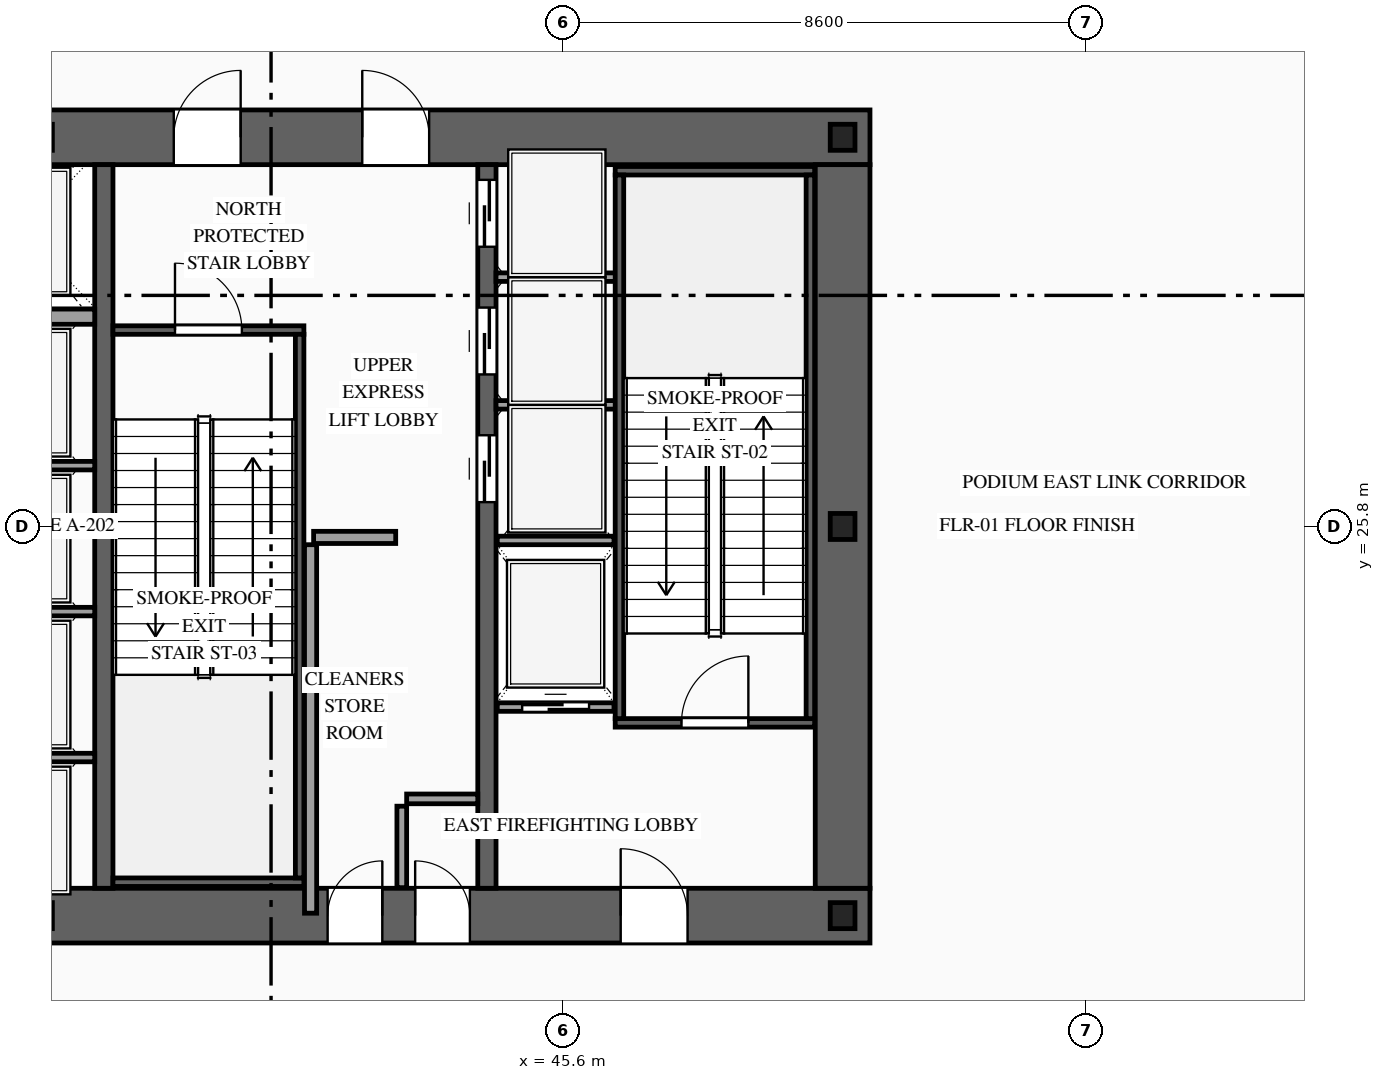
"""IFC4 building model, lengths in metres.
Left out: names, types, materials, properties, quantities, classifications, styles, units other than length and angle.
Written with IfcOpenShell. Run it as: python <this file> out.ifc"""

import sys

from ifc_helpers import new_model, si_unit, direction, frame, frame_2d, origin, origin_2d, place, context, subcontext, project, spatial, rectangle, i_section, extrude, source, transform, mapped, element, fill, save


model = new_model("IFC4")
c1 = context("Model", 3, precision=1e-05, world=origin(), true_north=direction((0.0, 1.0)))
c2 = subcontext(c1, "Body", "Model", "MODEL_VIEW")
j1 = project(units=[si_unit("LENGTHUNIT", "METRE"), si_unit("PLANEANGLEUNIT", "RADIAN")], contexts=[c1])
p1 = place(None, origin())
s1 = spatial("IfcSite", under=j1, at=p1, CompositionType="ELEMENT")
p2 = place(p1, origin())
s2 = spatial("IfcBuilding", under=s1, at=p2, CompositionType="ELEMENT")
p3 = place(p2, origin())
s3 = spatial("IfcBuildingStorey", under=s2, at=p3, CompositionType="ELEMENT", Elevation=0.0)
p4 = place(p3, frame((23.35, 19.4, 0.0), z_axis=(0.0, 0.0, 1.0), x_axis=(1.0, 0.0, 0.0)))
e1 = element("IfcWall", 1, at=p4, inside=s3, PredefinedType="SHEAR", context=c2, shape_type="SweptSolid", body=[
    extrude(rectangle(XDim=27.3, YDim=0.9, at=frame_2d((13.65, 0.0))), origin(), (0.0, 0.0, 1.0), 5.4),
])
p5 = place(p4, frame((2.1, 0.0, 0.0)))
e2 = element("IfcOpeningElement", 2, at=p5, cuts=e1, PredefinedType="OPENING", context=c2, shape_type="SweptSolid", body=[
    extrude(rectangle(XDim=1.1, YDim=2.2, at=frame_2d((0.55, 1.1))), frame((0.0, 0.465, 0.0), z_axis=(0.0, -1.0, 0.0), x_axis=(1.0, 0.0, 0.0)), (0.0, 0.0, 1.0), 0.93),
])
p6 = place(p4, frame((10.0, 0.0, 0.0)))
e3 = element("IfcOpeningElement", 3, at=p6, cuts=e1, PredefinedType="OPENING", context=c2, shape_type="SweptSolid", body=[
    extrude(rectangle(XDim=1.1, YDim=2.2, at=frame_2d((0.55, 1.1))), frame((0.0, 0.465, 0.0), z_axis=(0.0, -1.0, 0.0), x_axis=(1.0, 0.0, 0.0)), (0.0, 0.0, 1.0), 0.93),
])
p7 = place(p4, frame((23.2, 0.0, 0.0)))
e4 = element("IfcOpeningElement", 4, at=p7, cuts=e1, PredefinedType="OPENING", context=c2, shape_type="SweptSolid", body=[
    extrude(rectangle(XDim=1.1, YDim=2.2, at=frame_2d((0.55, 1.1))), frame((0.0, 0.465, 0.0), z_axis=(0.0, -1.0, 0.0), x_axis=(1.0, 0.0, 0.0)), (0.0, 0.0, 1.0), 0.93),
])
p8 = place(p4, frame((19.82, 0.0, 0.0)))
e5 = element("IfcOpeningElement", 5, at=p8, cuts=e1, PredefinedType="OPENING", context=c2, shape_type="SweptSolid", body=[
    extrude(rectangle(XDim=0.9, YDim=2.15, at=frame_2d((0.45, 1.075))), frame((0.0, 0.465, 0.0), z_axis=(0.0, -1.0, 0.0), x_axis=(1.0, 0.0, 0.0)), (0.0, 0.0, 1.0), 0.93),
])
p9 = place(p4, frame((18.38, 0.0, 0.0)))
e6 = element("IfcOpeningElement", 6, at=p9, cuts=e1, PredefinedType="OPENING", context=c2, shape_type="SweptSolid", body=[
    extrude(rectangle(XDim=0.9, YDim=2.15, at=frame_2d((0.45, 1.075))), frame((0.0, 0.465, 0.0), z_axis=(0.0, -1.0, 0.0), x_axis=(1.0, 0.0, 0.0)), (0.0, 0.0, 1.0), 0.93),
])
p10 = place(p3, frame((23.35, 32.2, 0.0), z_axis=(0.0, 0.0, 1.0), x_axis=(1.0, 0.0, 0.0)))
e7 = element("IfcWall", 7, at=p10, inside=s3, PredefinedType="SHEAR", context=c2, shape_type="SweptSolid", body=[
    extrude(rectangle(XDim=27.3, YDim=0.9, at=frame_2d((13.65, 0.0))), origin(), (0.0, 0.0, 1.0), 5.4),
])
p11 = place(p10, frame((4.72, 0.0, 0.0)))
e8 = element("IfcOpeningElement", 8, at=p11, cuts=e7, PredefinedType="OPENING", context=c2, shape_type="SweptSolid", body=[
    extrude(rectangle(XDim=0.9, YDim=2.15, at=frame_2d((0.45, 1.075))), frame((0.0, 0.465, 0.0), z_axis=(0.0, -1.0, 0.0), x_axis=(1.0, 0.0, 0.0)), (0.0, 0.0, 1.0), 0.93),
])
p12 = place(p10, frame((10.0, 0.0, 0.0)))
e9 = element("IfcOpeningElement", 9, at=p12, cuts=e7, PredefinedType="OPENING", context=c2, shape_type="SweptSolid", body=[
    extrude(rectangle(XDim=1.1, YDim=2.2, at=frame_2d((0.55, 1.1))), frame((0.0, 0.465, 0.0), z_axis=(0.0, -1.0, 0.0), x_axis=(1.0, 0.0, 0.0)), (0.0, 0.0, 1.0), 0.93),
])
p13 = place(p10, frame((15.85, 0.0, 0.0)))
e10 = element("IfcOpeningElement", 10, at=p13, cuts=e7, PredefinedType="OPENING", context=c2, shape_type="SweptSolid", body=[
    extrude(rectangle(XDim=1.1, YDim=2.2, at=frame_2d((0.55, 1.1))), frame((0.0, 0.465, 0.0), z_axis=(0.0, -1.0, 0.0), x_axis=(1.0, 0.0, 0.0)), (0.0, 0.0, 1.0), 0.93),
])
p14 = place(p10, frame((18.95, 0.0, 0.0)))
e11 = element("IfcOpeningElement", 11, at=p14, cuts=e7, PredefinedType="OPENING", context=c2, shape_type="SweptSolid", body=[
    extrude(rectangle(XDim=1.1, YDim=2.2, at=frame_2d((0.55, 1.1))), frame((0.0, 0.465, 0.0), z_axis=(0.0, -1.0, 0.0), x_axis=(1.0, 0.0, 0.0)), (0.0, 0.0, 1.0), 0.93),
])
m1 = source(origin(), c2, "Body", "SweptSolid", [
    extrude(rectangle(XDim=11.9, YDim=0.9, at=frame_2d((5.95, 0.0))), origin(), (0.0, 0.0, 1.0), 5.4),
])
p15 = place(p3, frame((50.2, 19.85, 0.0), z_axis=(0.0, 0.0, 1.0), x_axis=(0.0, 1.0, 0.0)))
e12 = element("IfcWall", 12, at=p15, inside=s3, PredefinedType="SHEAR", context=c2, shape_type="MappedRepresentation", body=[
    mapped(m1, transform((0.0, 0.0, 0.0), scale=1.0)),
])
m2 = source(origin(), c2, "Body", "SweptSolid", [
    extrude(rectangle(XDim=11.9, YDim=0.3, at=frame_2d((5.95, 0.0))), origin(), (0.0, 0.0, 1.0), 5.4),
])
p16 = place(p3, frame((38.05, 19.85, 0.0), z_axis=(0.0, 0.0, 1.0), x_axis=(0.0, 1.0, 0.0)))
e13 = element("IfcWall", 13, at=p16, inside=s3, PredefinedType="SOLIDWALL", context=c2, shape_type="MappedRepresentation", body=[
    mapped(m2, transform((0.0, 0.0, 0.0), scale=1.0)),
])
p17 = place(p3, frame((44.35, 19.85, 0.0), z_axis=(0.0, 0.0, 1.0), x_axis=(0.0, 1.0, 0.0)))
e14 = element("IfcWall", 14, at=p17, inside=s3, PredefinedType="SOLIDWALL", context=c2, shape_type="SweptSolid", body=[
    extrude(rectangle(XDim=11.9, YDim=0.3, at=frame_2d((5.95, 0.0))), origin(), (0.0, 0.0, 1.0), 5.4),
])
p18 = place(p17, frame((6.35, 0.0, 0.0)))
e15 = element("IfcOpeningElement", 15, at=p18, cuts=e14, PredefinedType="OPENING", context=c2, shape_type="SweptSolid", body=[
    extrude(rectangle(XDim=1.1, YDim=2.2, at=frame_2d((0.55, 1.1))), frame((0.0, 0.165, 0.0), z_axis=(0.0, -1.0, 0.0), x_axis=(1.0, 0.0, 0.0)), (0.0, 0.0, 1.0), 0.33),
])
p19 = place(p17, frame((8.45, 0.0, 0.0)))
e16 = element("IfcOpeningElement", 16, at=p19, cuts=e14, PredefinedType="OPENING", context=c2, shape_type="SweptSolid", body=[
    extrude(rectangle(XDim=1.1, YDim=2.2, at=frame_2d((0.55, 1.1))), frame((0.0, 0.165, 0.0), z_axis=(0.0, -1.0, 0.0), x_axis=(1.0, 0.0, 0.0)), (0.0, 0.0, 1.0), 0.33),
])
p20 = place(p17, frame((10.55, 0.0, 0.0)))
e17 = element("IfcOpeningElement", 17, at=p20, cuts=e14, PredefinedType="OPENING", context=c2, shape_type="SweptSolid", body=[
    extrude(rectangle(XDim=1.1, YDim=2.2, at=frame_2d((0.55, 1.1))), frame((0.0, 0.165, 0.0), z_axis=(0.0, -1.0, 0.0), x_axis=(1.0, 0.0, 0.0)), (0.0, 0.0, 1.0), 0.33),
])
m3 = source(origin(), c2, "Body", "SweptSolid", [
    extrude(i_section(OverallWidth=0.407, OverallDepth=0.428, WebThickness=0.02, FlangeThickness=0.035, at=origin_2d()), origin(), (0.0, 0.0, 1.0), 5.4),
])
for number, where, z_axis, x_axis in (
    (18, (37.0, 19.4, 0.0), (0.0, 0.0, 1.0), (1.0, 0.0, 0.0)),
    (19, (50.2, 19.4, 0.0), (0.0, 0.0, 1.0), (1.0, 0.0, 0.0)),
    (20, (50.2, 25.8, 0.0), (0.0, 0.0, 1.0), (1.0, 0.0, 0.0)),
    (21, (37.0, 32.2, 0.0), (0.0, 0.0, 1.0), (1.0, 0.0, 0.0)),
    (22, (50.2, 32.2, 0.0), (0.0, 0.0, 1.0), (1.0, 0.0, 0.0)),
):
    element("IfcColumn", number, at=place(p3, frame(where, z_axis=z_axis, x_axis=x_axis)), inside=s3, PredefinedType="COLUMN", context=c2, shape_type="MappedRepresentation", body=[
        mapped(m3, transform((0.0, 0.0, 0.0), scale=1.0)),
    ])
p21 = place(p3, frame((44.52, 22.83, 0.0), z_axis=(0.0, 0.0, 1.0), x_axis=(1.0, 0.0, 0.0)))
e23 = element("IfcWall", 23, at=p21, inside=s3, PredefinedType="SOLIDWALL", context=c2, shape_type="SweptSolid", body=[
    extrude(rectangle(XDim=1.92, YDim=0.14, at=frame_2d((0.96, 0.0))), origin(), (0.0, 0.0, 1.0), 5.12),
])
p22 = place(p21, frame((0.41, 0.0, 0.0)))
e24 = element("IfcOpeningElement", 24, at=p22, cuts=e23, PredefinedType="OPENING", context=c2, shape_type="SweptSolid", body=[
    extrude(rectangle(XDim=1.1, YDim=2.2, at=frame_2d((0.55, 1.1))), frame((0.0, 0.085, 0.0), z_axis=(0.0, -1.0, 0.0), x_axis=(1.0, 0.0, 0.0)), (0.0, 0.0, 1.0), 0.17),
])
m4 = source(origin(), c2, "Body", "SweptSolid", [
    extrude(rectangle(XDim=1.92, YDim=0.14, at=frame_2d((0.96, 0.0))), origin(), (0.0, 0.0, 1.0), 5.12),
])
p23 = place(p3, frame((44.52, 25.57, 0.0), z_axis=(0.0, 0.0, 1.0), x_axis=(1.0, 0.0, 0.0)))
e25 = element("IfcWall", 25, at=p23, inside=s3, PredefinedType="SOLIDWALL", context=c2, shape_type="MappedRepresentation", body=[
    mapped(m4, transform((0.0, 0.0, 0.0), scale=1.0)),
])
m5 = source(origin(), c2, "Body", "SweptSolid", [
    extrude(rectangle(XDim=2.4, YDim=0.14, at=frame_2d((1.2, 0.0))), origin(), (0.0, 0.0, 1.0), 5.12),
])
for number, where, z_axis, x_axis in (
    (26, (35.5, 22.0, 0.0), (0.0, 0.0, 1.0), (1.0, 0.0, 0.0)),
    (27, (35.5, 24.4, 0.0), (0.0, 0.0, 1.0), (1.0, 0.0, 0.0)),
    (28, (35.5, 26.8, 0.0), (0.0, 0.0, 1.0), (1.0, 0.0, 0.0)),
):
    element("IfcWall", number, at=place(p3, frame(where, z_axis=z_axis, x_axis=x_axis)), inside=s3, PredefinedType="SOLIDWALL", context=c2, shape_type="MappedRepresentation", body=[
        mapped(m5, transform((0.0, 0.0, 0.0), scale=1.0)),
    ])
m6 = source(origin(), c2, "Body", "SweptSolid", [
    extrude(rectangle(XDim=2.4, YDim=0.25, at=frame_2d((1.2, 0.0))), origin(), (0.0, 0.0, 1.0), 5.12),
])
p24 = place(p3, frame((35.5, 29.25, 0.0), z_axis=(0.0, 0.0, 1.0), x_axis=(1.0, 0.0, 0.0)))
e29 = element("IfcWall", 29, at=p24, inside=s3, PredefinedType="SOLIDWALL", context=c2, shape_type="MappedRepresentation", body=[
    mapped(m6, transform((0.0, 0.0, 0.0), scale=1.0)),
])
m7 = source(origin(), c2, "Body", "SweptSolid", [
    extrude(rectangle(XDim=2.0, YDim=0.14, at=frame_2d((1.0, 0.0))), origin(), (0.0, 0.0, 1.0), 5.12),
])
for number, where, z_axis, x_axis in (
    (30, (44.5, 27.8, 0.0), (0.0, 0.0, 1.0), (1.0, 0.0, 0.0)),
    (31, (44.5, 29.9, 0.0), (0.0, 0.0, 1.0), (1.0, 0.0, 0.0)),
):
    element("IfcWall", number, at=place(p3, frame(where, z_axis=z_axis, x_axis=x_axis)), inside=s3, PredefinedType="SOLIDWALL", context=c2, shape_type="MappedRepresentation", body=[
        mapped(m7, transform((0.0, 0.0, 0.0), scale=1.0)),
    ])
p25 = place(p3, frame((46.46, 22.57, 0.0), z_axis=(0.0, 0.0, 1.0), x_axis=(1.0, 0.0, 0.0)))
e32 = element("IfcWall", 32, at=p25, inside=s3, PredefinedType="SOLIDWALL", context=c2, shape_type="SweptSolid", body=[
    extrude(rectangle(XDim=3.28, YDim=0.14, at=frame_2d((1.64, 0.0))), origin(), (0.0, 0.0, 1.0), 5.12),
])
p26 = place(p25, frame((1.09, 0.0, 0.0)))
e33 = element("IfcOpeningElement", 33, at=p26, cuts=e32, PredefinedType="OPENING", context=c2, shape_type="SweptSolid", body=[
    extrude(rectangle(XDim=1.1, YDim=2.2, at=frame_2d((0.55, 1.1))), frame((0.0, 0.085, 0.0), z_axis=(0.0, -1.0, 0.0), x_axis=(1.0, 0.0, 0.0)), (0.0, 0.0, 1.0), 0.17),
])
m8 = source(origin(), c2, "Body", "SweptSolid", [
    extrude(rectangle(XDim=3.28, YDim=0.14, at=frame_2d((1.64, 0.0))), origin(), (0.0, 0.0, 1.0), 5.12),
])
p27 = place(p3, frame((46.46, 31.65, 0.0), z_axis=(0.0, 0.0, 1.0), x_axis=(1.0, 0.0, 0.0)))
e34 = element("IfcWall", 34, at=p27, inside=s3, PredefinedType="SOLIDWALL", context=c2, shape_type="MappedRepresentation", body=[
    mapped(m8, transform((0.0, 0.0, 0.0), scale=1.0)),
])
m9 = source(origin(), c2, "Body", "SweptSolid", [
    extrude(rectangle(XDim=8.94, YDim=0.14, at=frame_2d((4.47, 0.0))), origin(), (0.0, 0.0, 1.0), 5.12),
])
for number, where, z_axis, x_axis in (
    (35, (46.53, 22.64, 0.0), (0.0, 0.0, 1.0), (0.0, 1.0, 0.0)),
    (36, (49.67, 22.64, 0.0), (0.0, 0.0, 1.0), (0.0, 1.0, 0.0)),
):
    element("IfcWall", number, at=place(p3, frame(where, z_axis=z_axis, x_axis=x_axis)), inside=s3, PredefinedType="SOLIDWALL", context=c2, shape_type="MappedRepresentation", body=[
        mapped(m9, transform((0.0, 0.0, 0.0), scale=1.0)),
    ])
p28 = place(p3, frame((38.2, 29.03, 0.0), z_axis=(0.0, 0.0, 1.0), x_axis=(1.0, 0.0, 0.0)))
e37 = element("IfcWall", 37, at=p28, inside=s3, PredefinedType="SOLIDWALL", context=c2, shape_type="SweptSolid", body=[
    extrude(rectangle(XDim=3.14, YDim=0.14, at=frame_2d((1.57, 0.0))), origin(), (0.0, 0.0, 1.0), 5.12),
])
p29 = place(p28, frame((1.02, 0.0, 0.0)))
e38 = element("IfcOpeningElement", 38, at=p29, cuts=e37, PredefinedType="OPENING", context=c2, shape_type="SweptSolid", body=[
    extrude(rectangle(XDim=1.1, YDim=2.2, at=frame_2d((0.55, 1.1))), frame((0.0, 0.085, 0.0), z_axis=(0.0, -1.0, 0.0), x_axis=(1.0, 0.0, 0.0)), (0.0, 0.0, 1.0), 0.17),
])
m10 = source(origin(), c2, "Body", "SweptSolid", [
    extrude(rectangle(XDim=3.14, YDim=0.14, at=frame_2d((1.57, 0.0))), origin(), (0.0, 0.0, 1.0), 5.12),
])
p30 = place(p3, frame((38.2, 19.95, 0.0), z_axis=(0.0, 0.0, 1.0), x_axis=(1.0, 0.0, 0.0)))
e39 = element("IfcWall", 39, at=p30, inside=s3, PredefinedType="SOLIDWALL", context=c2, shape_type="MappedRepresentation", body=[
    mapped(m10, transform((0.0, 0.0, 0.0), scale=1.0)),
])
m11 = source(origin(), c2, "Body", "SweptSolid", [
    extrude(rectangle(XDim=8.94, YDim=0.14, at=frame_2d((4.47, 0.0))), origin(), (0.0, 0.0, 1.0), 5.12),
])
p31 = place(p3, frame((41.27, 20.02, 0.0), z_axis=(0.0, 0.0, 1.0), x_axis=(0.0, 1.0, 0.0)))
e40 = element("IfcWall", 40, at=p31, inside=s3, PredefinedType="SOLIDWALL", context=c2, shape_type="MappedRepresentation", body=[
    mapped(m11, transform((0.0, 0.0, 0.0), scale=1.0)),
])
m12 = source(origin(), c2, "Body", "SweptSolid", [
    extrude(rectangle(XDim=1.34, YDim=0.16, at=frame_2d((0.67, 0.0))), origin(), (0.0, 0.0, 1.0), 5.12),
])
p32 = place(p3, frame((42.95, 19.86, 0.0), z_axis=(0.0, 0.0, 1.0), x_axis=(0.0, 1.0, 0.0)))
e41 = element("IfcWall", 41, at=p32, inside=s3, PredefinedType="PARTITIONING", context=c2, shape_type="MappedRepresentation", body=[
    mapped(m12, transform((0.0, 0.0, 0.0), scale=1.0)),
])
m13 = source(origin(), c2, "Body", "SweptSolid", [
    extrude(rectangle(XDim=1.17, YDim=0.16, at=frame_2d((0.585, 0.0))), origin(), (0.0, 0.0, 1.0), 5.12),
])
p33 = place(p3, frame((43.03, 21.32, 0.0), z_axis=(0.0, 0.0, 1.0), x_axis=(1.0, 0.0, 0.0)))
e42 = element("IfcWall", 42, at=p33, inside=s3, PredefinedType="PARTITIONING", context=c2, shape_type="MappedRepresentation", body=[
    mapped(m13, transform((0.0, 0.0, 0.0), scale=1.0)),
])
m14 = source(origin(), c2, "Body", "SweptSolid", [
    extrude(rectangle(XDim=6.06, YDim=0.2, at=frame_2d((3.03, 0.0))), origin(), (0.0, 0.0, 1.0), 5.12),
])
p34 = place(p3, frame((41.45, 19.44, 0.0), z_axis=(0.0, 0.0, 1.0), x_axis=(0.0, 1.0, 0.0)))
e43 = element("IfcWall", 43, at=p34, inside=s3, PredefinedType="PARTITIONING", context=c2, shape_type="MappedRepresentation", body=[
    mapped(m14, transform((0.0, 0.0, 0.0), scale=1.0)),
])
m15 = source(origin(), c2, "Body", "SweptSolid", [
    extrude(rectangle(XDim=1.35, YDim=0.2, at=frame_2d((0.675, 0.0))), origin(), (0.0, 0.0, 1.0), 5.12),
])
p35 = place(p3, frame((41.5, 25.62, 0.0), z_axis=(0.0, 0.0, 1.0), x_axis=(1.0, 0.0, 0.0)))
e44 = element("IfcWall", 44, at=p35, inside=s3, PredefinedType="PARTITIONING", context=c2, shape_type="MappedRepresentation", body=[
    mapped(m15, transform((0.0, 0.0, 0.0), scale=1.0)),
])
m16 = source(origin(), c2, "Body", "SweptSolid", [
    extrude(rectangle(XDim=1.1, YDim=2.2, at=frame_2d((0.55, 1.1))), frame((0.0, 0.025, 0.0), z_axis=(0.0, -1.0, 0.0), x_axis=(1.0, 0.0, 0.0)), (0.0, 0.0, 1.0), 0.05),
])
p36 = place(p22, origin())
e45 = element("IfcDoor", 45, at=p36, inside=s3, OperationType="SLIDING_TO_RIGHT", PredefinedType="DOOR", context=c2, shape_type="MappedRepresentation", body=[
    mapped(m16, transform((0.0, 0.0, 0.0), scale=1.0)),
])
fill(e24, e45)
p37 = place(p18, origin())
e46 = element("IfcDoor", 46, at=p37, inside=s3, OperationType="SLIDING_TO_LEFT", PredefinedType="DOOR", context=c2, shape_type="MappedRepresentation", body=[
    mapped(m16, transform((0.0, 0.0, 0.0), scale=1.0)),
])
fill(e15, e46)
p38 = place(p19, origin())
e47 = element("IfcDoor", 47, at=p38, inside=s3, OperationType="SLIDING_TO_RIGHT", PredefinedType="DOOR", context=c2, shape_type="MappedRepresentation", body=[
    mapped(m16, transform((0.0, 0.0, 0.0), scale=1.0)),
])
fill(e16, e47)
p39 = place(p20, origin())
e48 = element("IfcDoor", 48, at=p39, inside=s3, OperationType="SLIDING_TO_LEFT", PredefinedType="DOOR", context=c2, shape_type="MappedRepresentation", body=[
    mapped(m16, transform((0.0, 0.0, 0.0), scale=1.0)),
])
fill(e17, e48)
m17 = source(origin(), c2, "Body", "SweptSolid", [
    extrude(rectangle(XDim=1.1, YDim=2.2, at=frame_2d((0.55, 1.1))), frame((0.0, 0.025, 0.0), z_axis=(0.0, -1.0, 0.0), x_axis=(1.0, 0.0, 0.0)), (0.0, 0.0, 1.0), 0.05),
])
p40 = place(p26, origin())
e49 = element("IfcDoor", 49, at=p40, inside=s3, OperationType="SINGLE_SWING_RIGHT", PredefinedType="DOOR", context=c2, shape_type="MappedRepresentation", body=[
    mapped(m17, transform((0.0, 0.0, 0.0), scale=1.0)),
])
fill(e33, e49)
p41 = place(p29, origin())
e50 = element("IfcDoor", 50, at=p41, inside=s3, OperationType="SINGLE_SWING_LEFT", PredefinedType="DOOR", context=c2, shape_type="MappedRepresentation", body=[
    mapped(m17, transform((0.0, 0.0, 0.0), scale=1.0)),
])
fill(e38, e50)
p42 = place(p7, origin())
e51 = element("IfcDoor", 51, at=p42, inside=s3, OperationType="SINGLE_SWING_LEFT", PredefinedType="DOOR", context=c2, shape_type="MappedRepresentation", body=[
    mapped(m17, transform((0.0, 0.0, 0.0), scale=1.0)),
])
fill(e4, e51)
p43 = place(p13, origin())
e52 = element("IfcDoor", 52, at=p43, inside=s3, OperationType="SINGLE_SWING_RIGHT", PredefinedType="DOOR", context=c2, shape_type="MappedRepresentation", body=[
    mapped(m17, transform((0.0, 0.0, 0.0), scale=1.0)),
])
fill(e10, e52)
p44 = place(p14, origin())
e53 = element("IfcDoor", 53, at=p44, inside=s3, OperationType="SINGLE_SWING_LEFT", PredefinedType="DOOR", context=c2, shape_type="MappedRepresentation", body=[
    mapped(m17, transform((0.0, 0.0, 0.0), scale=1.0)),
])
fill(e11, e53)
m18 = source(origin(), c2, "Body", "SweptSolid", [
    extrude(rectangle(XDim=0.9, YDim=2.15, at=frame_2d((0.45, 1.075))), frame((0.0, 0.025, 0.0), z_axis=(0.0, -1.0, 0.0), x_axis=(1.0, 0.0, 0.0)), (0.0, 0.0, 1.0), 0.05),
])
p45 = place(p8, origin())
e54 = element("IfcDoor", 54, at=p45, inside=s3, OperationType="SINGLE_SWING_LEFT", PredefinedType="DOOR", context=c2, shape_type="MappedRepresentation", body=[
    mapped(m18, transform((0.0, 0.0, 0.0), scale=1.0)),
])
fill(e5, e54)
p46 = place(p9, origin())
e55 = element("IfcDoor", 55, at=p46, inside=s3, OperationType="SINGLE_SWING_RIGHT", PredefinedType="DOOR", context=c2, shape_type="MappedRepresentation", body=[
    mapped(m18, transform((0.0, 0.0, 0.0), scale=1.0)),
])
fill(e6, e55)
save(model, sys.argv[1])
